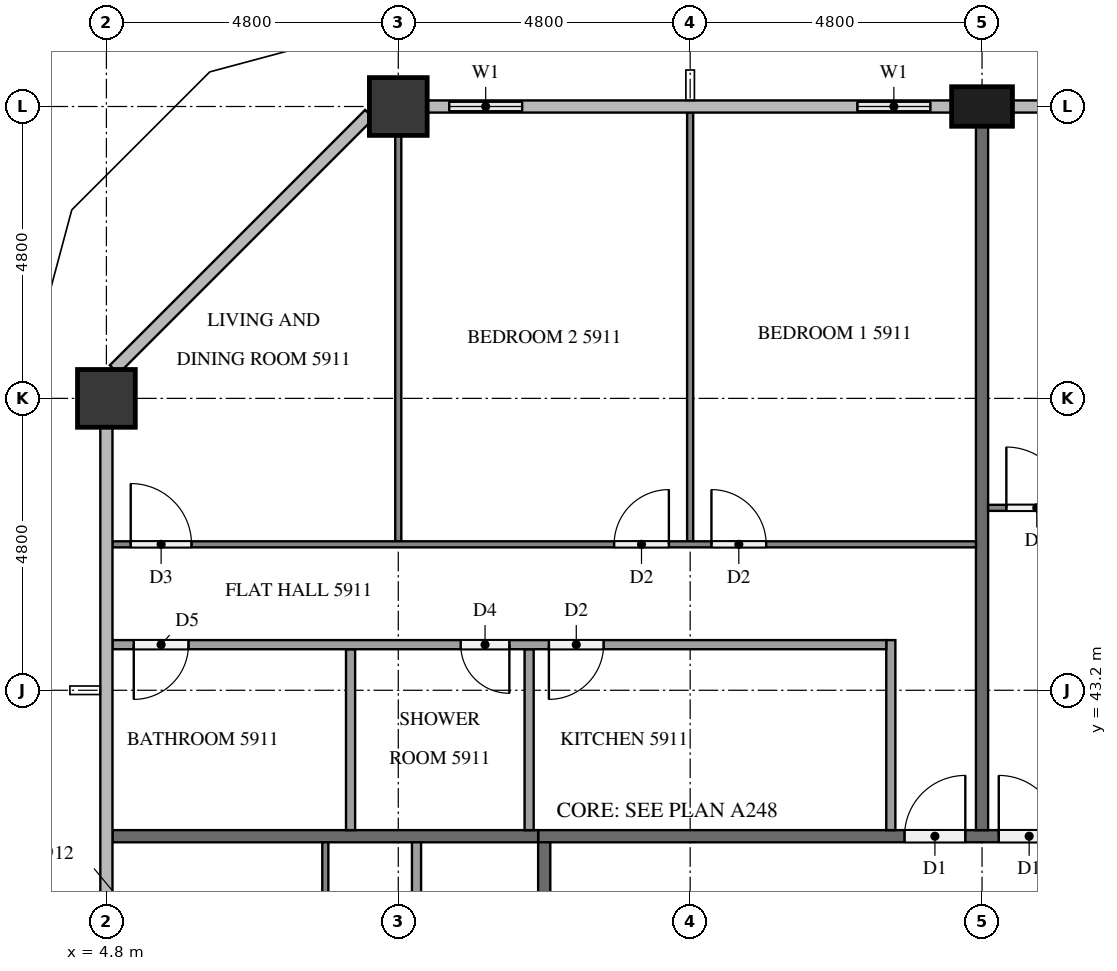
"""IFC4 building model, lengths in metres.
Left out: names, types, materials, properties, quantities, classifications, styles, units other than length and angle.
Written with IfcOpenShell. Run it as: python <this file> out.ifc"""

import sys

from ifc_helpers import new_model, si_unit, direction, frame, frame_2d, origin, origin_2d, place, context, subcontext, project, spatial, rectangle, extrude, element, fill, save


model = new_model("IFC4")
c1 = context("Model", 3, precision=1e-05, world=origin(), true_north=direction((0.0, 1.0)))
c2 = subcontext(c1, "Body", "Model", "MODEL_VIEW")
j1 = project(units=[si_unit("LENGTHUNIT", "METRE"), si_unit("PLANEANGLEUNIT", "RADIAN")], contexts=[c1])
p1 = place(None, origin())
s1 = spatial("IfcSite", under=j1, at=p1, CompositionType="ELEMENT")
p2 = place(p1, origin())
s2 = spatial("IfcBuilding", under=s1, at=p2, CompositionType="ELEMENT")
p3 = place(p2, frame((0.0, 0.0, 226.3)))
s3 = spatial("IfcBuildingStorey", under=s2, at=p3, CompositionType="ELEMENT", Elevation=226.3)
p4 = place(p3, frame((19.2, 52.8, 0.0), z_axis=(0.0, 0.0, 1.0), x_axis=(1.0, 0.0, 0.0)))
e1 = element("IfcColumn", 1, at=p4, inside=s3, PredefinedType="COLUMN", context=c2, shape_type="SweptSolid", body=[
    extrude(rectangle(XDim=1.0, YDim=0.65, at=origin_2d()), origin(), (0.0, 0.0, 1.0), 3.2),
])
for number, where, z_axis, x_axis in (
    (2, (9.6, 52.8, 0.0), (0.0, 0.0, 1.0), (1.0, 0.0, 0.0)),
    (3, (4.8, 48.0, 0.0), (0.0, 0.0, 1.0), (1.0, 0.0, 0.0)),
):
    element("IfcColumn", number, at=place(p3, frame(where, z_axis=z_axis, x_axis=x_axis)), inside=s3, PredefinedType="COLUMN", context=c2, shape_type="SweptSolid", body=[
        extrude(rectangle(XDim=0.95, YDim=0.95, at=origin_2d()), origin(), (0.0, 0.0, 1.0), 3.2),
    ])
p5 = place(p3, frame((18.7, 52.8, 0.0), z_axis=(0.0, 0.0, 1.0), x_axis=(-1.0, 0.0, 0.0)))
e4 = element("IfcWall", 4, at=p5, inside=s3, PredefinedType="SOLIDWALL", context=c2, shape_type="SweptSolid", body=[
    extrude(rectangle(XDim=1.9, YDim=0.15, at=frame_2d((0.95, 0.0))), origin(), (0.0, 0.0, 1.0), 3.2),
])
p6 = place(p5, frame((0.35, 0.0, 0.9)))
e5 = element("IfcOpeningElement", 5, at=p6, cuts=e4, PredefinedType="OPENING", context=c2, shape_type="SweptSolid", body=[
    extrude(rectangle(XDim=1.2, YDim=1.4, at=frame_2d((0.6, 0.7))), frame((0.0, 0.085, 0.0), z_axis=(0.0, -1.0, 0.0), x_axis=(1.0, 0.0, 0.0)), (0.0, 0.0, 1.0), 0.17),
])
p7 = place(p3, frame((12.0, 52.8, 0.0), z_axis=(0.0, 0.0, 1.0), x_axis=(-1.0, 0.0, 0.0)))
e6 = element("IfcWall", 6, at=p7, inside=s3, PredefinedType="SOLIDWALL", context=c2, shape_type="SweptSolid", body=[
    extrude(rectangle(XDim=1.925, YDim=0.15, at=frame_2d((0.962, 0.0))), origin(), (0.0, 0.0, 1.0), 3.2),
])
p8 = place(p7, frame((0.363, 0.0, 0.9)))
e7 = element("IfcOpeningElement", 7, at=p8, cuts=e6, PredefinedType="OPENING", context=c2, shape_type="SweptSolid", body=[
    extrude(rectangle(XDim=1.2, YDim=1.4, at=frame_2d((0.6, 0.7))), frame((0.0, 0.085, 0.0), z_axis=(0.0, -1.0, 0.0), x_axis=(1.0, 0.0, 0.0)), (0.0, 0.0, 1.0), 0.17),
])
p9 = place(p3, frame((11.9, 40.8, 0.0), z_axis=(0.0, 0.0, 1.0), x_axis=(1.0, 0.0, 0.0)))
e8 = element("IfcWall", 8, at=p9, inside=s3, PredefinedType="PARTITIONING", context=c2, shape_type="SweptSolid", body=[
    extrude(rectangle(XDim=38.6, YDim=0.2, at=frame_2d((19.3, 0.0))), origin(), (0.0, 0.0, 1.0), 3.2),
])
p10 = place(p9, frame((33.975, 0.0, 0.0)))
e9 = element("IfcOpeningElement", 9, at=p10, cuts=e8, PredefinedType="OPENING", context=c2, shape_type="SweptSolid", body=[
    extrude(rectangle(XDim=1.0, YDim=2.1, at=frame_2d((0.5, 1.05))), frame((0.0, 0.11, 0.0), z_axis=(0.0, -1.0, 0.0), x_axis=(1.0, 0.0, 0.0)), (0.0, 0.0, 1.0), 0.22),
])
p11 = place(p9, frame((14.725, 0.0, 0.0)))
e10 = element("IfcOpeningElement", 10, at=p11, cuts=e8, PredefinedType="OPENING", context=c2, shape_type="SweptSolid", body=[
    extrude(rectangle(XDim=1.1, YDim=2.1, at=frame_2d((0.55, 1.05))), frame((0.0, 0.11, 0.0), z_axis=(0.0, -1.0, 0.0), x_axis=(1.0, 0.0, 0.0)), (0.0, 0.0, 1.0), 0.22),
])
p12 = place(p9, frame((7.575, 0.0, 0.0)))
e11 = element("IfcOpeningElement", 11, at=p12, cuts=e8, PredefinedType="OPENING", context=c2, shape_type="SweptSolid", body=[
    extrude(rectangle(XDim=1.0, YDim=2.1, at=frame_2d((0.5, 1.05))), frame((0.0, 0.11, 0.0), z_axis=(0.0, -1.0, 0.0), x_axis=(1.0, 0.0, 0.0)), (0.0, 0.0, 1.0), 0.22),
])
p13 = place(p9, frame((6.025, 0.0, 0.0)))
e12 = element("IfcOpeningElement", 12, at=p13, cuts=e8, PredefinedType="OPENING", context=c2, shape_type="SweptSolid", body=[
    extrude(rectangle(XDim=1.0, YDim=2.1, at=frame_2d((0.5, 1.05))), frame((0.0, 0.11, 0.0), z_axis=(0.0, -1.0, 0.0), x_axis=(1.0, 0.0, 0.0)), (0.0, 0.0, 1.0), 0.22),
])
p14 = place(p3, frame((12.0, 12.1, 0.0), z_axis=(0.0, 0.0, 1.0), x_axis=(0.0, 1.0, 0.0)))
e13 = element("IfcWall", 13, at=p14, inside=s3, PredefinedType="PARTITIONING", context=c2, shape_type="SweptSolid", body=[
    extrude(rectangle(XDim=28.6, YDim=0.2, at=frame_2d((14.3, 0.0))), origin(), (0.0, 0.0, 1.0), 3.2),
])
p15 = place(p14, frame((9.725, 0.0, 0.0)))
e14 = element("IfcOpeningElement", 14, at=p15, cuts=e13, PredefinedType="OPENING", context=c2, shape_type="SweptSolid", body=[
    extrude(rectangle(XDim=1.1, YDim=2.1, at=frame_2d((0.55, 1.05))), frame((0.0, 0.11, 0.0), z_axis=(0.0, -1.0, 0.0), x_axis=(1.0, 0.0, 0.0)), (0.0, 0.0, 1.0), 0.22),
])
p16 = place(p14, frame((0.175, 0.0, 0.0)))
e15 = element("IfcOpeningElement", 15, at=p16, cuts=e13, PredefinedType="OPENING", context=c2, shape_type="SweptSolid", body=[
    extrude(rectangle(XDim=1.0, YDim=2.1, at=frame_2d((0.5, 1.05))), frame((0.0, 0.11, 0.0), z_axis=(0.0, -1.0, 0.0), x_axis=(1.0, 0.0, 0.0)), (0.0, 0.0, 1.0), 0.22),
])
p17 = place(p3, frame((19.2, 52.475, 0.0), z_axis=(0.0, 0.0, 1.0), x_axis=(0.0, -1.0, 0.0)))
e16 = element("IfcWall", 16, at=p17, inside=s3, PredefinedType="PARTITIONING", context=c2, shape_type="SweptSolid", body=[
    extrude(rectangle(XDim=11.575, YDim=0.2, at=frame_2d((5.788, 0.0))), origin(), (0.0, 0.0, 1.0), 3.2),
])
p18 = place(p3, frame((4.9, 40.8, 0.0), z_axis=(0.0, 0.0, 1.0), x_axis=(1.0, 0.0, 0.0)))
e17 = element("IfcWall", 17, at=p18, inside=s3, PredefinedType="PARTITIONING", context=c2, shape_type="SweptSolid", body=[
    extrude(rectangle(XDim=7.0, YDim=0.2, at=frame_2d((3.5, 0.0))), origin(), (0.0, 0.0, 1.0), 3.2),
])
p19 = place(p3, frame((19.3, 46.2, 0.0), z_axis=(0.0, 0.0, 1.0), x_axis=(1.0, 0.0, 0.0)))
e18 = element("IfcWall", 18, at=p19, inside=s3, PredefinedType="PARTITIONING", context=c2, shape_type="SweptSolid", body=[
    extrude(rectangle(XDim=7.0, YDim=0.1, at=frame_2d((3.5, 0.0))), origin(), (0.0, 0.0, 1.0), 3.2),
])
p20 = place(p19, frame((0.3, 0.0, 0.0)))
e19 = element("IfcOpeningElement", 19, at=p20, cuts=e18, PredefinedType="OPENING", context=c2, shape_type="SweptSolid", body=[
    extrude(rectangle(XDim=1.0, YDim=2.1, at=frame_2d((0.5, 1.05))), frame((0.0, 0.06, 0.0), z_axis=(0.0, -1.0, 0.0), x_axis=(1.0, 0.0, 0.0)), (0.0, 0.0, 1.0), 0.12),
])
p21 = place(p3, frame((14.4, 45.65, 0.0), z_axis=(0.0, 0.0, 1.0), x_axis=(0.0, 1.0, 0.0)))
e20 = element("IfcWall", 20, at=p21, inside=s3, PredefinedType="PARTITIONING", context=c2, shape_type="SweptSolid", body=[
    extrude(rectangle(XDim=7.05, YDim=0.1, at=frame_2d((3.525, 0.0))), origin(), (0.0, 0.0, 1.0), 3.2),
])
p22 = place(p3, frame((9.6, 45.65, 0.0), z_axis=(0.0, 0.0, 1.0), x_axis=(0.0, 1.0, 0.0)))
e21 = element("IfcWall", 21, at=p22, inside=s3, PredefinedType="PARTITIONING", context=c2, shape_type="SweptSolid", body=[
    extrude(rectangle(XDim=6.675, YDim=0.1, at=frame_2d((3.337, 0.0))), origin(), (0.0, 0.0, 1.0), 3.2),
])
p23 = place(p3, frame((4.9, 45.6, 0.0), z_axis=(0.0, 0.0, 1.0), x_axis=(1.0, 0.0, 0.0)))
e22 = element("IfcWall", 22, at=p23, inside=s3, PredefinedType="PARTITIONING", context=c2, shape_type="SweptSolid", body=[
    extrude(rectangle(XDim=14.2, YDim=0.1, at=frame_2d((7.1, 0.0))), origin(), (0.0, 0.0, 1.0), 3.2),
])
p24 = place(p23, frame((9.85, 0.0, 0.0)))
e23 = element("IfcOpeningElement", 23, at=p24, cuts=e22, PredefinedType="OPENING", context=c2, shape_type="SweptSolid", body=[
    extrude(rectangle(XDim=0.9, YDim=2.1, at=frame_2d((0.45, 1.05))), frame((0.0, 0.06, 0.0), z_axis=(0.0, -1.0, 0.0), x_axis=(1.0, 0.0, 0.0)), (0.0, 0.0, 1.0), 0.12),
])
p25 = place(p23, frame((8.25, 0.0, 0.0)))
e24 = element("IfcOpeningElement", 24, at=p25, cuts=e22, PredefinedType="OPENING", context=c2, shape_type="SweptSolid", body=[
    extrude(rectangle(XDim=0.9, YDim=2.1, at=frame_2d((0.45, 1.05))), frame((0.0, 0.06, 0.0), z_axis=(0.0, -1.0, 0.0), x_axis=(1.0, 0.0, 0.0)), (0.0, 0.0, 1.0), 0.12),
])
p26 = place(p23, frame((0.3, 0.0, 0.0)))
e25 = element("IfcOpeningElement", 25, at=p26, cuts=e22, PredefinedType="OPENING", context=c2, shape_type="SweptSolid", body=[
    extrude(rectangle(XDim=1.0, YDim=2.1, at=frame_2d((0.5, 1.05))), frame((0.0, 0.06, 0.0), z_axis=(0.0, -1.0, 0.0), x_axis=(1.0, 0.0, 0.0)), (0.0, 0.0, 1.0), 0.12),
])
for number, where, z_axis, x_axis in (
    (26, (11.752, 40.9, 0.0), (0.0, 0.0, 1.0), (0.0, 1.0, 0.0)),
    (27, (8.815, 40.9, 0.0), (0.0, 0.0, 1.0), (0.0, 1.0, 0.0)),
):
    element("IfcWall", number, at=place(p3, frame(where, z_axis=z_axis, x_axis=x_axis)), inside=s3, PredefinedType="PARTITIONING", context=c2, shape_type="SweptSolid", body=[
        extrude(rectangle(XDim=2.975, YDim=0.15, at=frame_2d((1.488, 0.0))), origin(), (0.0, 0.0, 1.0), 3.2),
    ])
p27 = place(p3, frame((17.7, 40.9, 0.0), z_axis=(0.0, 0.0, 1.0), x_axis=(0.0, 1.0, 0.0)))
e28 = element("IfcWall", 28, at=p27, inside=s3, PredefinedType="PARTITIONING", context=c2, shape_type="SweptSolid", body=[
    extrude(rectangle(XDim=3.125, YDim=0.15, at=frame_2d((1.562, 0.0))), origin(), (0.0, 0.0, 1.0), 3.2),
])
p28 = place(p3, frame((17.625, 43.95, 0.0), z_axis=(0.0, 0.0, 1.0), x_axis=(-1.0, 0.0, 0.0)))
e29 = element("IfcWall", 29, at=p28, inside=s3, PredefinedType="PARTITIONING", context=c2, shape_type="SweptSolid", body=[
    extrude(rectangle(XDim=12.725, YDim=0.15, at=frame_2d((6.363, 0.0))), origin(), (0.0, 0.0, 1.0), 3.2),
])
p29 = place(p28, frame((4.648, 0.0, 0.0)))
e30 = element("IfcOpeningElement", 30, at=p29, cuts=e29, PredefinedType="OPENING", context=c2, shape_type="SweptSolid", body=[
    extrude(rectangle(XDim=0.9, YDim=2.1, at=frame_2d((0.45, 1.05))), frame((0.0, 0.085, 0.0), z_axis=(0.0, -1.0, 0.0), x_axis=(1.0, 0.0, 0.0)), (0.0, 0.0, 1.0), 0.17),
])
p30 = place(p28, frame((6.198, 0.0, 0.0)))
e31 = element("IfcOpeningElement", 31, at=p30, cuts=e29, PredefinedType="OPENING", context=c2, shape_type="SweptSolid", body=[
    extrude(rectangle(XDim=0.8, YDim=2.1, at=frame_2d((0.4, 1.05))), frame((0.0, 0.085, 0.0), z_axis=(0.0, -1.0, 0.0), x_axis=(1.0, 0.0, 0.0)), (0.0, 0.0, 1.0), 0.17),
])
p31 = place(p28, frame((11.475, 0.0, 0.0)))
e32 = element("IfcOpeningElement", 32, at=p31, cuts=e29, PredefinedType="OPENING", context=c2, shape_type="SweptSolid", body=[
    extrude(rectangle(XDim=0.9, YDim=2.1, at=frame_2d((0.45, 1.05))), frame((0.0, 0.085, 0.0), z_axis=(0.0, -1.0, 0.0), x_axis=(1.0, 0.0, 0.0)), (0.0, 0.0, 1.0), 0.17),
])
p32 = place(p3, frame((8.4, 21.7, 0.0), z_axis=(0.0, 0.0, 1.0), x_axis=(0.0, 1.0, 0.0)))
e33 = element("IfcWall", 33, at=p32, inside=s3, PredefinedType="PARTITIONING", context=c2, shape_type="SweptSolid", body=[
    extrude(rectangle(XDim=19.0, YDim=0.1, at=frame_2d((9.5, 0.0))), origin(), (0.0, 0.0, 1.0), 3.2),
])
p33 = place(p32, frame((3.45, 0.0, 0.0)))
e34 = element("IfcOpeningElement", 34, at=p33, cuts=e33, PredefinedType="OPENING", context=c2, shape_type="SweptSolid", body=[
    extrude(rectangle(XDim=0.9, YDim=2.1, at=frame_2d((0.45, 1.05))), frame((0.0, 0.06, 0.0), z_axis=(0.0, -1.0, 0.0), x_axis=(1.0, 0.0, 0.0)), (0.0, 0.0, 1.0), 0.12),
])
p34 = place(p32, frame((5.05, 0.0, 0.0)))
e35 = element("IfcOpeningElement", 35, at=p34, cuts=e33, PredefinedType="OPENING", context=c2, shape_type="SweptSolid", body=[
    extrude(rectangle(XDim=0.9, YDim=2.1, at=frame_2d((0.45, 1.05))), frame((0.0, 0.06, 0.0), z_axis=(0.0, -1.0, 0.0), x_axis=(1.0, 0.0, 0.0)), (0.0, 0.0, 1.0), 0.12),
])
p35 = place(p32, frame((13.05, 0.0, 0.0)))
e36 = element("IfcOpeningElement", 36, at=p35, cuts=e33, PredefinedType="OPENING", context=c2, shape_type="SweptSolid", body=[
    extrude(rectangle(XDim=0.9, YDim=2.1, at=frame_2d((0.45, 1.05))), frame((0.0, 0.06, 0.0), z_axis=(0.0, -1.0, 0.0), x_axis=(1.0, 0.0, 0.0)), (0.0, 0.0, 1.0), 0.12),
])
p36 = place(p32, frame((14.65, 0.0, 0.0)))
e37 = element("IfcOpeningElement", 37, at=p36, cuts=e33, PredefinedType="OPENING", context=c2, shape_type="SweptSolid", body=[
    extrude(rectangle(XDim=1.0, YDim=2.1, at=frame_2d((0.5, 1.05))), frame((0.0, 0.06, 0.0), z_axis=(0.0, -1.0, 0.0), x_axis=(1.0, 0.0, 0.0)), (0.0, 0.0, 1.0), 0.12),
])
p37 = place(p3, frame((9.9, 40.7, 0.0), z_axis=(0.0, 0.0, 1.0), x_axis=(0.0, -1.0, 0.0)))
e38 = element("IfcWall", 38, at=p37, inside=s3, PredefinedType="PARTITIONING", context=c2, shape_type="SweptSolid", body=[
    extrude(rectangle(XDim=17.525, YDim=0.15, at=frame_2d((8.762, 0.0))), origin(), (0.0, 0.0, 1.0), 3.2),
])
p38 = place(p37, frame((14.564, 0.0, 0.0)))
e39 = element("IfcOpeningElement", 39, at=p38, cuts=e38, PredefinedType="OPENING", context=c2, shape_type="SweptSolid", body=[
    extrude(rectangle(XDim=0.8, YDim=2.1, at=frame_2d((0.4, 1.05))), frame((0.0, 0.085, 0.0), z_axis=(0.0, -1.0, 0.0), x_axis=(1.0, 0.0, 0.0)), (0.0, 0.0, 1.0), 0.17),
])
p39 = place(p37, frame((13.014, 0.0, 0.0)))
e40 = element("IfcOpeningElement", 40, at=p39, cuts=e38, PredefinedType="OPENING", context=c2, shape_type="SweptSolid", body=[
    extrude(rectangle(XDim=0.9, YDim=2.1, at=frame_2d((0.45, 1.05))), frame((0.0, 0.085, 0.0), z_axis=(0.0, -1.0, 0.0), x_axis=(1.0, 0.0, 0.0)), (0.0, 0.0, 1.0), 0.17),
])
p40 = place(p37, frame((6.897, 0.0, 0.0)))
e41 = element("IfcOpeningElement", 41, at=p40, cuts=e38, PredefinedType="OPENING", context=c2, shape_type="SweptSolid", body=[
    extrude(rectangle(XDim=0.8, YDim=2.1, at=frame_2d((0.4, 1.05))), frame((0.0, 0.085, 0.0), z_axis=(0.0, -1.0, 0.0), x_axis=(1.0, 0.0, 0.0)), (0.0, 0.0, 1.0), 0.17),
])
p41 = place(p37, frame((5.347, 0.0, 0.0)))
e42 = element("IfcOpeningElement", 42, at=p41, cuts=e38, PredefinedType="OPENING", context=c2, shape_type="SweptSolid", body=[
    extrude(rectangle(XDim=0.9, YDim=2.1, at=frame_2d((0.45, 1.05))), frame((0.0, 0.085, 0.0), z_axis=(0.0, -1.0, 0.0), x_axis=(1.0, 0.0, 0.0)), (0.0, 0.0, 1.0), 0.17),
])
p42 = place(p6, origin())
e43 = element("IfcWindow", 43, at=p42, inside=s3, PartitioningType="SINGLE_PANEL", PredefinedType="WINDOW", context=c2, shape_type="SweptSolid", body=[
    extrude(rectangle(XDim=1.2, YDim=1.4, at=frame_2d((0.6, 0.7))), frame((0.0, 0.03, 0.0), z_axis=(0.0, -1.0, 0.0), x_axis=(1.0, 0.0, 0.0)), (0.0, 0.0, 1.0), 0.06),
])
fill(e5, e43)
p43 = place(p8, origin())
e44 = element("IfcWindow", 44, at=p43, inside=s3, PartitioningType="SINGLE_PANEL", PredefinedType="WINDOW", context=c2, shape_type="SweptSolid", body=[
    extrude(rectangle(XDim=1.2, YDim=1.4, at=frame_2d((0.6, 0.7))), frame((0.0, 0.03, 0.0), z_axis=(0.0, -1.0, 0.0), x_axis=(1.0, 0.0, 0.0)), (0.0, 0.0, 1.0), 0.06),
])
fill(e7, e44)
p44 = place(p12, origin())
e45 = element("IfcDoor", 45, at=p44, inside=s3, OperationType="SINGLE_SWING_LEFT", PredefinedType="DOOR", context=c2, shape_type="SweptSolid", body=[
    extrude(rectangle(XDim=1.0, YDim=2.1, at=frame_2d((0.5, 1.05))), frame((0.0, 0.025, 0.0), z_axis=(0.0, -1.0, 0.0), x_axis=(1.0, 0.0, 0.0)), (0.0, 0.0, 1.0), 0.05),
])
fill(e11, e45)
p45 = place(p13, origin())
e46 = element("IfcDoor", 46, at=p45, inside=s3, OperationType="SINGLE_SWING_RIGHT", PredefinedType="DOOR", context=c2, shape_type="SweptSolid", body=[
    extrude(rectangle(XDim=1.0, YDim=2.1, at=frame_2d((0.5, 1.05))), frame((0.0, 0.025, 0.0), z_axis=(0.0, -1.0, 0.0), x_axis=(1.0, 0.0, 0.0)), (0.0, 0.0, 1.0), 0.05),
])
fill(e12, e46)
p46 = place(p20, origin())
e47 = element("IfcDoor", 47, at=p46, inside=s3, OperationType="SINGLE_SWING_LEFT", PredefinedType="DOOR", context=c2, shape_type="SweptSolid", body=[
    extrude(rectangle(XDim=1.0, YDim=2.1, at=frame_2d((0.5, 1.05))), frame((0.0, 0.025, 0.0), z_axis=(0.0, -1.0, 0.0), x_axis=(1.0, 0.0, 0.0)), (0.0, 0.0, 1.0), 0.05),
])
fill(e19, e47)
p47 = place(p24, origin())
e48 = element("IfcDoor", 48, at=p47, inside=s3, OperationType="SINGLE_SWING_LEFT", PredefinedType="DOOR", context=c2, shape_type="SweptSolid", body=[
    extrude(rectangle(XDim=0.9, YDim=2.1, at=frame_2d((0.45, 1.05))), frame((0.0, 0.025, 0.0), z_axis=(0.0, -1.0, 0.0), x_axis=(1.0, 0.0, 0.0)), (0.0, 0.0, 1.0), 0.05),
])
fill(e23, e48)
p48 = place(p25, origin())
e49 = element("IfcDoor", 49, at=p48, inside=s3, OperationType="SINGLE_SWING_RIGHT", PredefinedType="DOOR", context=c2, shape_type="SweptSolid", body=[
    extrude(rectangle(XDim=0.9, YDim=2.1, at=frame_2d((0.45, 1.05))), frame((0.0, 0.025, 0.0), z_axis=(0.0, -1.0, 0.0), x_axis=(1.0, 0.0, 0.0)), (0.0, 0.0, 1.0), 0.05),
])
fill(e24, e49)
p49 = place(p26, origin())
e50 = element("IfcDoor", 50, at=p49, inside=s3, OperationType="SINGLE_SWING_LEFT", PredefinedType="DOOR", context=c2, shape_type="SweptSolid", body=[
    extrude(rectangle(XDim=1.0, YDim=2.1, at=frame_2d((0.5, 1.05))), frame((0.0, 0.025, 0.0), z_axis=(0.0, -1.0, 0.0), x_axis=(1.0, 0.0, 0.0)), (0.0, 0.0, 1.0), 0.05),
])
fill(e25, e50)
p50 = place(p29, origin())
e51 = element("IfcDoor", 51, at=p50, inside=s3, OperationType="SINGLE_SWING_RIGHT", PredefinedType="DOOR", context=c2, shape_type="SweptSolid", body=[
    extrude(rectangle(XDim=0.9, YDim=2.1, at=frame_2d((0.45, 1.05))), frame((0.0, 0.025, 0.0), z_axis=(0.0, -1.0, 0.0), x_axis=(1.0, 0.0, 0.0)), (0.0, 0.0, 1.0), 0.05),
])
fill(e30, e51)
p51 = place(p30, origin())
e52 = element("IfcDoor", 52, at=p51, inside=s3, OperationType="SINGLE_SWING_LEFT", PredefinedType="DOOR", context=c2, shape_type="SweptSolid", body=[
    extrude(rectangle(XDim=0.8, YDim=2.1, at=frame_2d((0.4, 1.05))), frame((0.0, 0.025, 0.0), z_axis=(0.0, -1.0, 0.0), x_axis=(1.0, 0.0, 0.0)), (0.0, 0.0, 1.0), 0.05),
])
fill(e31, e52)
p52 = place(p31, origin())
e53 = element("IfcDoor", 53, at=p52, inside=s3, OperationType="SINGLE_SWING_RIGHT", PredefinedType="DOOR", context=c2, shape_type="SweptSolid", body=[
    extrude(rectangle(XDim=0.9, YDim=2.1, at=frame_2d((0.45, 1.05))), frame((0.0, 0.025, 0.0), z_axis=(0.0, -1.0, 0.0), x_axis=(1.0, 0.0, 0.0)), (0.0, 0.0, 1.0), 0.05),
])
fill(e32, e53)
save(model, sys.argv[1])
